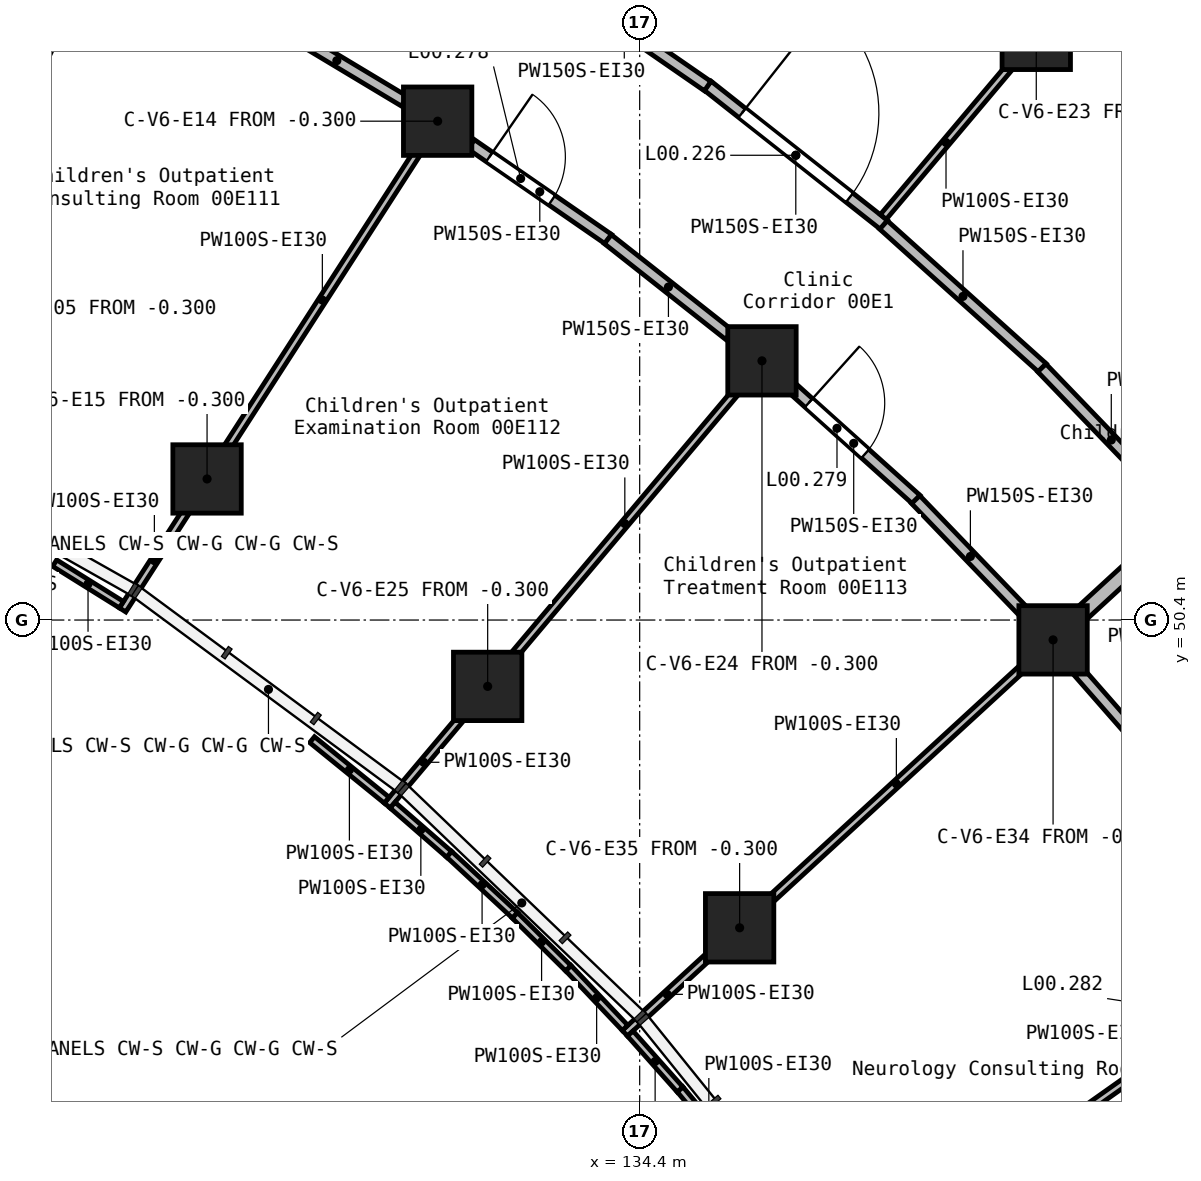
"""IFC4 building model, lengths in metres.
Left out: names, types, materials, properties, quantities, classifications, styles, units other than length and angle.
Written with IfcOpenShell. Run it as: python <this file> out.ifc"""

import sys

from ifc_helpers import new_model, si_unit, direction, frame, frame_2d, origin, origin_2d, place, context, subcontext, project, spatial, rectangle, extrude, element, fill, save


model = new_model("IFC4")
c1 = context("Model", 3, precision=1e-05, world=origin(), true_north=direction((0.0, 1.0)))
c2 = subcontext(c1, "Body", "Model", "MODEL_VIEW")
j1 = project(units=[si_unit("LENGTHUNIT", "METRE"), si_unit("PLANEANGLEUNIT", "RADIAN")], contexts=[c1])
p1 = place(None, origin())
s1 = spatial("IfcSite", under=j1, at=p1, CompositionType="ELEMENT")
p2 = place(p1, origin())
s2 = spatial("IfcBuilding", under=s1, at=p2, CompositionType="ELEMENT")
p3 = place(p2, origin())
s3 = spatial("IfcBuildingStorey", under=s2, at=p3, CompositionType="ELEMENT", Elevation=0.0)
for number, where, z_axis, x_axis in (
    (1, (128.708, 52.256, -0.3), (0.0, 0.0, 1.0), (1.0, 0.0, 0.0)),
    (2, (131.742, 56.963, -0.3), (0.0, 0.0, 1.0), (1.0, 0.0, 0.0)),
    (3, (132.4, 49.527, -0.3), (0.0, 0.0, 1.0), (1.0, 0.0, 0.0)),
    (4, (135.715, 46.351, -0.3), (0.0, 0.0, 1.0), (1.0, 0.0, 0.0)),
    (5, (136.009, 53.81, -0.3), (0.0, 0.0, 1.0), (1.0, 0.0, 0.0)),
    (6, (139.618, 58.092, -0.3), (0.0, 0.0, 1.0), (1.0, 0.0, 0.0)),
    (7, (139.839, 50.139, -0.3), (0.0, 0.0, 1.0), (1.0, 0.0, 0.0)),
):
    element("IfcColumn", number, at=place(p3, frame(where, z_axis=z_axis, x_axis=x_axis)), inside=s3, PredefinedType="COLUMN", context=c2, shape_type="SweptSolid", body=[
        extrude(rectangle(XDim=0.9, YDim=0.9, at=origin_2d()), origin(), (0.0, 0.0, 1.0), 5.7),
    ])
p4 = place(p3, frame((140.196, 50.467, 0.0), z_axis=(0.0, 0.0, 1.0), x_axis=(0.736519787736, 0.676415997943, 0.0)))
e8 = element("IfcWall", 8, at=p4, inside=s3, PredefinedType="SOLIDWALL", context=c2, shape_type="SweptSolid", body=[
    extrude(rectangle(XDim=1.966, YDim=0.2, at=frame_2d((0.983, 0.0))), origin(), (0.0, 0.0, 1.0), 5.05),
])
p5 = place(p3, frame((135.293, 57.43, 0.0), z_axis=(0.0, 0.0, 1.0), x_axis=(0.785039104315, -0.619446208073, 0.0)))
e9 = element("IfcWall", 9, at=p5, inside=s3, PredefinedType="PARTITIONING", context=c2, shape_type="SweptSolid", body=[
    extrude(rectangle(XDim=2.958, YDim=0.15, at=frame_2d((1.479, 0.0))), origin(), (0.0, 0.0, 1.0), 5.05),
])
p6 = place(p5, frame((0.579, 0.0, 0.0)))
e10 = element("IfcOpeningElement", 10, at=p6, cuts=e9, PredefinedType="OPENING", context=c2, shape_type="SweptSolid", body=[
    extrude(rectangle(XDim=1.8, YDim=2.1, at=frame_2d((0.9, 1.05))), frame((0.0, 0.085, 0.0), z_axis=(0.0, -1.0, 0.0), x_axis=(1.0, 0.0, 0.0)), (0.0, 0.0, 1.0), 0.17),
])
p7 = place(p3, frame((137.608, 55.598, 0.0), z_axis=(0.0, 0.0, 1.0), x_axis=(0.743501368773, -0.668734412628, 0.0)))
e11 = element("IfcWall", 11, at=p7, inside=s3, PredefinedType="PARTITIONING", context=c2, shape_type="SweptSolid", body=[
    extrude(rectangle(XDim=2.812, YDim=0.15, at=frame_2d((1.406, 0.0))), origin(), (0.0, 0.0, 1.0), 5.05),
])
p8 = place(p3, frame((133.101, 58.94, 0.0), z_axis=(0.0, 0.0, 1.0), x_axis=(0.822620530797, -0.568590768754, 0.0)))
e12 = element("IfcWall", 12, at=p8, inside=s3, PredefinedType="PARTITIONING", context=c2, shape_type="SweptSolid", body=[
    extrude(rectangle(XDim=2.666, YDim=0.15, at=frame_2d((1.333, 0.0))), origin(), (0.0, 0.0, 1.0), 5.05),
])
p9 = place(p3, frame((139.691, 53.718, 0.0), z_axis=(0.0, 0.0, 1.0), x_axis=(0.693447550136, -0.720507109757, 0.0)))
e13 = element("IfcWall", 13, at=p9, inside=s3, PredefinedType="PARTITIONING", context=c2, shape_type="SweptSolid", body=[
    extrude(rectangle(XDim=2.635, YDim=0.15, at=frame_2d((1.317, 0.0))), origin(), (0.0, 0.0, 1.0), 5.05),
])
p10 = place(p3, frame((136.393, 53.465, 0.0), z_axis=(0.0, 0.0, 1.0), x_axis=(0.743617683722, -0.668605070618, 0.0)))
e14 = element("IfcWall", 14, at=p10, inside=s3, PredefinedType="PARTITIONING", context=c2, shape_type="SweptSolid", body=[
    extrude(rectangle(XDim=2.213, YDim=0.15, at=frame_2d((1.106, 0.0))), origin(), (0.0, 0.0, 1.0), 5.05),
])
p11 = place(p10, frame((0.311, 0.0, 0.0)))
e15 = element("IfcOpeningElement", 15, at=p11, cuts=e14, PredefinedType="OPENING", context=c2, shape_type="SweptSolid", body=[
    extrude(rectangle(XDim=1.0, YDim=2.1, at=frame_2d((0.5, 1.05))), frame((0.0, 0.085, 0.0), z_axis=(0.0, -1.0, 0.0), x_axis=(1.0, 0.0, 0.0)), (0.0, 0.0, 1.0), 0.17),
])
p12 = place(p3, frame((132.184, 56.658, 0.0), z_axis=(0.0, 0.0, 1.0), x_axis=(0.82273696549, -0.568422277551, 0.0)))
e16 = element("IfcWall", 16, at=p12, inside=s3, PredefinedType="PARTITIONING", context=c2, shape_type="SweptSolid", body=[
    extrude(rectangle(XDim=2.193, YDim=0.15, at=frame_2d((1.096, 0.0))), origin(), (0.0, 0.0, 1.0), 5.05),
])
p13 = place(p12, frame((0.29, 0.0, 0.0)))
e17 = element("IfcOpeningElement", 17, at=p13, cuts=e16, PredefinedType="OPENING", context=c2, shape_type="SweptSolid", body=[
    extrude(rectangle(XDim=1.0, YDim=2.1, at=frame_2d((0.5, 1.05))), frame((0.0, 0.085, 0.0), z_axis=(0.0, -1.0, 0.0), x_axis=(1.0, 0.0, 0.0)), (0.0, 0.0, 1.0), 0.17),
])
p14 = place(p3, frame((133.981, 55.41, 0.0), z_axis=(0.0, 0.0, 1.0), x_axis=(0.784968928218, -0.619535133574, 0.0)))
e18 = element("IfcWall", 18, at=p14, inside=s3, PredefinedType="PARTITIONING", context=c2, shape_type="SweptSolid", body=[
    extrude(rectangle(XDim=2.031, YDim=0.15, at=frame_2d((1.015, 0.0))), origin(), (0.0, 0.0, 1.0), 5.05),
])
p15 = place(p3, frame((129.527, 58.293, 0.0), z_axis=(0.0, 0.0, 1.0), x_axis=(0.8573370195, -0.514755509922, 0.0)))
e19 = element("IfcWall", 19, at=p15, inside=s3, PredefinedType="PARTITIONING", context=c2, shape_type="SweptSolid", body=[
    extrude(rectangle(XDim=2.073, YDim=0.15, at=frame_2d((1.037, 0.0))), origin(), (0.0, 0.0, 1.0), 5.05),
])
p16 = place(p3, frame((140.184, 49.71, 0.0), z_axis=(0.0, 0.0, 1.0), x_axis=(0.659209376091, -0.751959439381, 0.0)))
e20 = element("IfcWall", 20, at=p16, inside=s3, PredefinedType="PARTITIONING", context=c2, shape_type="SweptSolid", body=[
    extrude(rectangle(XDim=2.035, YDim=0.15, at=frame_2d((1.017, 0.0))), origin(), (0.0, 0.0, 1.0), 5.05),
])
p17 = place(p3, frame((138.031, 51.985, 0.0), z_axis=(0.0, 0.0, 1.0), x_axis=(0.693216793474, -0.7207291289, 0.0)))
e21 = element("IfcWall", 21, at=p17, inside=s3, PredefinedType="PARTITIONING", context=c2, shape_type="SweptSolid", body=[
    extrude(rectangle(XDim=2.076, YDim=0.15, at=frame_2d((1.038, 0.0))), origin(), (0.0, 0.0, 1.0), 5.05),
])
p18 = place(p3, frame((131.079, 47.96, 0.0), z_axis=(0.0, 0.0, 1.0), x_axis=(0.644403525256, 0.764685619479, 0.0)))
e22 = element("IfcWall", 22, at=p18, inside=s3, PredefinedType="PARTITIONING", context=c2, shape_type="SweptSolid", body=[
    extrude(rectangle(XDim=1.488, YDim=0.1, at=frame_2d((0.744, 0.0))), origin(), (0.0, 0.0, 1.0), 5.05),
])
p19 = place(p3, frame((132.762, 49.958, 0.0), z_axis=(0.0, 0.0, 1.0), x_axis=(0.644429680937, 0.76466357722, 0.0)))
e23 = element("IfcWall", 23, at=p19, inside=s3, PredefinedType="PARTITIONING", context=c2, shape_type="SweptSolid", body=[
    extrude(rectangle(XDim=4.475, YDim=0.1, at=frame_2d((2.238, 0.0))), origin(), (0.0, 0.0, 1.0), 5.05),
])
p20 = place(p3, frame((127.597, 50.533, 0.0), z_axis=(0.0, 0.0, 1.0), x_axis=(0.541741092646, 0.840545411348, 0.0)))
e24 = element("IfcWall", 24, at=p20, inside=s3, PredefinedType="PARTITIONING", context=c2, shape_type="SweptSolid", body=[
    extrude(rectangle(XDim=1.543, YDim=0.1, at=frame_2d((0.771, 0.0))), origin(), (0.0, 0.0, 1.0), 5.05),
])
p21 = place(p3, frame((128.983, 52.683, 0.0), z_axis=(0.0, 0.0, 1.0), x_axis=(0.541806664818, 0.840503145716, 0.0)))
e25 = element("IfcWall", 25, at=p21, inside=s3, PredefinedType="PARTITIONING", context=c2, shape_type="SweptSolid", body=[
    extrude(rectangle(XDim=4.585, YDim=0.1, at=frame_2d((2.293, 0.0))), origin(), (0.0, 0.0, 1.0), 5.05),
])
p22 = place(p3, frame((139.026, 43.081, 0.0), z_axis=(0.0, 0.0, 1.0), x_axis=(0.816637661001, 0.577150700108, 0.0)))
e26 = element("IfcWall", 26, at=p22, inside=s3, PredefinedType="PARTITIONING", context=c2, shape_type="SweptSolid", body=[
    extrude(rectangle(XDim=4.551, YDim=0.1, at=frame_2d((2.275, 0.0))), origin(), (0.0, 0.0, 1.0), 5.05),
])
p23 = place(p3, frame((134.205, 44.964, 0.0), z_axis=(0.0, 0.0, 1.0), x_axis=(0.736497059378, 0.676440745023, 0.0)))
e27 = element("IfcWall", 27, at=p23, inside=s3, PredefinedType="PARTITIONING", context=c2, shape_type="SweptSolid", body=[
    extrude(rectangle(XDim=1.512, YDim=0.1, at=frame_2d((0.756, 0.0))), origin(), (0.0, 0.0, 1.0), 5.05),
])
p24 = place(p3, frame((136.111, 46.715, 0.0), z_axis=(0.0, 0.0, 1.0), x_axis=(0.736475017651, 0.676464742892, 0.0)))
e28 = element("IfcWall", 28, at=p24, inside=s3, PredefinedType="PARTITIONING", context=c2, shape_type="SweptSolid", body=[
    extrude(rectangle(XDim=4.524, YDim=0.1, at=frame_2d((2.262, 0.0))), origin(), (0.0, 0.0, 1.0), 5.05),
])
p25 = place(p3, frame((137.605, 55.704, 0.0), z_axis=(0.0, 0.0, 1.0), x_axis=(0.644432238292, 0.764661421971, 0.0)))
e29 = element("IfcWall", 29, at=p25, inside=s3, PredefinedType="PARTITIONING", context=c2, shape_type="SweptSolid", body=[
    extrude(rectangle(XDim=2.561, YDim=0.1, at=frame_2d((1.28, 0.0))), origin(), (0.0, 0.0, 1.0), 5.05),
])
p26 = place(p3, frame((130.09, 48.826, 0.0), z_axis=(0.0, 0.0, 1.0), x_axis=(0.776627985422, -0.629959500492, 0.0)))
e30 = element("IfcWall", 30, at=p26, inside=s3, PredefinedType="PARTITIONING", context=c2, shape_type="SweptSolid", body=[
    extrude(rectangle(XDim=1.263, YDim=0.1, at=frame_2d((0.632, 0.0))), origin(), (0.0, 0.0, 1.0), 5.05),
])
p27 = place(p3, frame((126.703, 51.149, 0.0), z_axis=(0.0, 0.0, 1.0), x_axis=(0.848687049906, -0.528895350067, 0.0)))
e31 = element("IfcWall", 31, at=p27, inside=s3, PredefinedType="PARTITIONING", context=c2, shape_type="SweptSolid", body=[
    extrude(rectangle(XDim=1.034, YDim=0.1, at=frame_2d((0.517, 0.0))), origin(), (0.0, 0.0, 1.0), 5.05),
])
p28 = place(p3, frame((133.461, 45.821, 0.0), z_axis=(0.0, 0.0, 1.0), x_axis=(0.688400207225, -0.725331065578, 0.0)))
e32 = element("IfcWall", 32, at=p28, inside=s3, PredefinedType="PARTITIONING", context=c2, shape_type="SweptSolid", body=[
    extrude(rectangle(XDim=1.084, YDim=0.1, at=frame_2d((0.542, 0.0))), origin(), (0.0, 0.0, 1.0), 5.05),
])
for number, where, z_axis, x_axis in (
    (33, (134.931, 44.226, 0.0), (0.0, 0.0, 1.0), (0.64, -0.769, 0.0)),
    (34, (131.892, 47.32, 0.0), (0.0, 0.0, 1.0), (0.733, -0.68, 0.0)),
):
    element("IfcWall", number, at=place(p3, frame(where, z_axis=z_axis, x_axis=x_axis)), inside=s3, PredefinedType="PARTITIONING", context=c2, shape_type="SweptSolid", body=[
        extrude(rectangle(XDim=1.185, YDim=0.1, at=frame_2d((0.592, 0.0))), origin(), (0.0, 0.0, 1.0), 5.05),
    ])
p29 = place(p3, frame((132.758, 46.514, 0.0), z_axis=(0.0, 0.0, 1.0), x_axis=(0.710804317615, -0.703389808043, 0.0)))
e35 = element("IfcWall", 35, at=p29, inside=s3, PredefinedType="PARTITIONING", context=c2, shape_type="SweptSolid", body=[
    extrude(rectangle(XDim=0.988, YDim=0.1, at=frame_2d((0.494, 0.0))), origin(), (0.0, 0.0, 1.0), 5.05),
])
p30 = place(p3, frame((131.149, 47.965, 0.0), z_axis=(0.0, 0.0, 1.0), x_axis=(0.75424788942, -0.656589766373, 0.0)))
e36 = element("IfcWall", 36, at=p30, inside=s3, PredefinedType="PARTITIONING", context=c2, shape_type="SweptSolid", body=[
    extrude(rectangle(XDim=0.985, YDim=0.1, at=frame_2d((0.492, 0.0))), origin(), (0.0, 0.0, 1.0), 5.05),
])
p31 = place(p3, frame((134.276, 44.96, 0.0), z_axis=(0.0, 0.0, 1.0), x_axis=(0.66477897218, -0.747040104779, 0.0)))
e37 = element("IfcWall", 37, at=p31, inside=s3, PredefinedType="PARTITIONING", context=c2, shape_type="SweptSolid", body=[
    extrude(rectangle(XDim=0.985, YDim=0.1, at=frame_2d((0.493, 0.0))), origin(), (0.0, 0.0, 1.0), 5.05),
])
p32 = place(p6, frame((1.8, 0.0, 0.0), z_axis=(0.0, 0.0, 1.0), x_axis=(-1.0, 0.0, 0.0)))
e38 = element("IfcDoor", 38, at=p32, inside=s3, OperationType="DOUBLE_DOOR_SINGLE_SWING", PredefinedType="DOOR", context=c2, shape_type="SweptSolid", body=[
    extrude(rectangle(XDim=1.8, YDim=2.1, at=frame_2d((0.9, 1.05))), frame((0.0, 0.025, 0.0), z_axis=(0.0, -1.0, 0.0), x_axis=(1.0, 0.0, 0.0)), (0.0, 0.0, 1.0), 0.05),
])
fill(e10, e38)
p33 = place(p13, frame((1.0, 0.0, 0.0), z_axis=(0.0, 0.0, 1.0), x_axis=(-1.0, 0.0, 0.0)))
e39 = element("IfcDoor", 39, at=p33, inside=s3, OperationType="SINGLE_SWING_RIGHT", PredefinedType="DOOR", context=c2, shape_type="SweptSolid", body=[
    extrude(rectangle(XDim=1.0, YDim=2.1, at=frame_2d((0.5, 1.05))), frame((0.0, 0.025, 0.0), z_axis=(0.0, -1.0, 0.0), x_axis=(1.0, 0.0, 0.0)), (0.0, 0.0, 1.0), 0.05),
])
fill(e17, e39)
p34 = place(p11, frame((1.0, 0.0, 0.0), z_axis=(0.0, 0.0, 1.0), x_axis=(-1.0, 0.0, 0.0)))
e40 = element("IfcDoor", 40, at=p34, inside=s3, OperationType="SINGLE_SWING_RIGHT", PredefinedType="DOOR", context=c2, shape_type="SweptSolid", body=[
    extrude(rectangle(XDim=1.0, YDim=2.1, at=frame_2d((0.5, 1.05))), frame((0.0, 0.025, 0.0), z_axis=(0.0, -1.0, 0.0), x_axis=(1.0, 0.0, 0.0)), (0.0, 0.0, 1.0), 0.05),
])
fill(e15, e40)
save(model, sys.argv[1])
